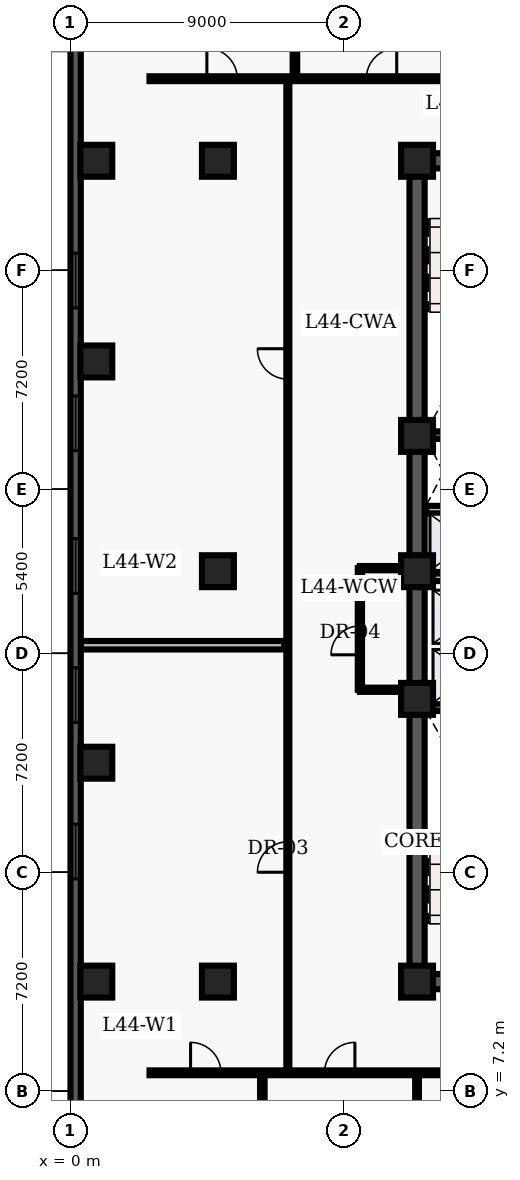
"""IFC4 building model, lengths in metres.
Left out: names, types, materials, properties, quantities, classifications, styles, units other than length and angle.
Written with IfcOpenShell. Run it as: python <this file> out.ifc"""

import sys

from ifc_helpers import new_model, entity, si_unit, converted_unit, direction, frame, origin_with_axes, origin_2d_with_axis, place, context, subcontext, project, spatial, polyline, rectangle, outline, extrude, element, fill, save


model = new_model("IFC4")
c1 = context("Model", 3, precision=1e-05, world=origin_with_axes(), true_north=direction((0.0, 1.0)))
c2 = subcontext(c1, "Body", "Model", "MODEL_VIEW")
j1 = project(units=[si_unit("LENGTHUNIT", "METRE"), converted_unit("PLANEANGLEUNIT", "DEGREE", entity("IfcPlaneAngleMeasure", 0.017), si_unit("PLANEANGLEUNIT", "RADIAN"), dimensions=[0, 0, 0, 0, 0, 0, 0])], contexts=[c1])
p1 = place(None, origin_with_axes())
s1 = spatial("IfcSite", under=j1, at=p1, CompositionType="ELEMENT")
p2 = place(p1, origin_with_axes())
s2 = spatial("IfcBuilding", under=s1, at=p2, CompositionType="ELEMENT")
p3 = place(p2, frame((0.0, 0.0, 179.7), z_axis=(0.0, 0.0, 1.0), x_axis=(1.0, 0.0, 0.0)))
s3 = spatial("IfcBuildingStorey", under=s2, at=p3, CompositionType="ELEMENT", Elevation=179.7)
p4 = place(p3, frame((11.4, 10.8, 0.0), z_axis=(0.0, 0.0, 1.0), x_axis=(0.0, 1.0, 0.0)))
e1 = element("IfcWall", 1, at=p4, inside=s3, PredefinedType="SHEAR", context=c2, shape_type="SweptSolid", body=[
    extrude(outline(polyline([(0.0, -0.25), (27.0, -0.25), (27.0, 0.25), (0.0, 0.25), (0.0, -0.25)])), origin_with_axes(), (0.0, 0.0, 1.0), 3.66),
])
p5 = place(p3, frame((11.4, 10.8, 0.0), z_axis=(0.0, 0.0, 1.0), x_axis=(1.0, 0.0, 0.0)))
e2 = element("IfcWall", 2, at=p5, inside=s3, PredefinedType="SHEAR", context=c2, shape_type="SweptSolid", body=[
    extrude(outline(polyline([(0.0, -0.25), (7.2, -0.25), (7.2, 0.25), (0.0, 0.25), (0.0, -0.25)])), origin_with_axes(), (0.0, 0.0, 1.0), 3.66),
])
p6 = place(p5, frame((2.625, 0.0, 0.0), z_axis=(0.0, 0.0, 1.0), x_axis=(1.0, 0.0, 0.0)))
e3 = element("IfcOpeningElement", 3, at=p6, cuts=e2, PredefinedType="OPENING", context=c2, shape_type="SweptSolid", body=[
    extrude(rectangle(XDim=1.05, YDim=0.52, at=origin_2d_with_axis()), origin_with_axes(), (0.0, 0.0, 1.0), 2.15),
])
p7 = place(p3, frame((11.4, 37.8, 0.0), z_axis=(0.0, 0.0, 1.0), x_axis=(1.0, 0.0, 0.0)))
e4 = element("IfcWall", 4, at=p7, inside=s3, PredefinedType="SHEAR", context=c2, shape_type="SweptSolid", body=[
    extrude(outline(polyline([(0.0, -0.25), (7.2, -0.25), (7.2, 0.25), (0.0, 0.25), (0.0, -0.25)])), origin_with_axes(), (0.0, 0.0, 1.0), 3.66),
])
p8 = place(p7, frame((2.625, 0.0, 0.0), z_axis=(0.0, 0.0, 1.0), x_axis=(1.0, 0.0, 0.0)))
e5 = element("IfcOpeningElement", 5, at=p8, cuts=e4, PredefinedType="OPENING", context=c2, shape_type="SweptSolid", body=[
    extrude(rectangle(XDim=1.05, YDim=0.52, at=origin_2d_with_axis()), origin_with_axes(), (0.0, 0.0, 1.0), 2.15),
])
for number, where, z_axis, x_axis in (
    (6, (11.65, 19.825, 0.0), (0.0, 0.0, 1.0), (1.0, 0.0, 0.0)),
    (7, (11.65, 28.775, 0.0), (0.0, 0.0, 1.0), (1.0, 0.0, 0.0)),
):
    element("IfcWall", number, at=place(p3, frame(where, z_axis=z_axis, x_axis=x_axis)), inside=s3, PredefinedType="SHEAR", context=c2, shape_type="SweptSolid", body=[
        extrude(outline(polyline([(0.0, -0.125), (6.7, -0.125), (6.7, 0.125), (0.0, 0.125), (0.0, -0.125)])), origin_with_axes(), (0.0, 0.0, 1.0), 3.66),
    ])
p9 = place(p3, frame((11.7, 24.1, 0.0), z_axis=(0.0, 0.0, 1.0), x_axis=(1.0, 0.0, 0.0)))
e8 = element("IfcWall", 8, at=p9, inside=s3, PredefinedType="SOLIDWALL", context=c2, shape_type="SweptSolid", body=[
    extrude(outline(polyline([(0.0, -0.125), (6.6, -0.125), (6.6, 0.125), (0.0, 0.125), (0.0, -0.125)])), origin_with_axes(), (0.0, 0.0, 1.0), 2.7),
])
p10 = place(p9, frame((3.75, 0.0, 0.0), z_axis=(0.0, 0.0, 1.0), x_axis=(1.0, 0.0, 0.0)))
e9 = element("IfcOpeningElement", 9, at=p10, cuts=e8, PredefinedType="OPENING", context=c2, shape_type="SweptSolid", body=[
    extrude(rectangle(XDim=0.9, YDim=0.27, at=origin_2d_with_axis()), origin_with_axes(), (0.0, 0.0, 1.0), 2.15),
])
p11 = place(p3, frame((11.7, 26.325, 0.0), z_axis=(0.0, 0.0, 1.0), x_axis=(1.0, 0.0, 0.0)))
e10 = element("IfcWall", 10, at=p11, inside=s3, PredefinedType="SOLIDWALL", context=c2, shape_type="SweptSolid", body=[
    extrude(outline(polyline([(0.0, -0.125), (6.6, -0.125), (6.6, 0.125), (0.0, 0.125), (0.0, -0.125)])), origin_with_axes(), (0.0, 0.0, 1.0), 2.7),
])
p12 = place(p11, frame((3.5, 0.0, 0.0), z_axis=(0.0, 0.0, 1.0), x_axis=(1.0, 0.0, 0.0)))
e11 = element("IfcOpeningElement", 11, at=p12, cuts=e10, PredefinedType="OPENING", context=c2, shape_type="SweptSolid", body=[
    extrude(rectangle(XDim=0.9, YDim=0.27, at=origin_2d_with_axis()), origin_with_axes(), (0.0, 0.0, 1.0), 2.15),
])
for number, where, z_axis, x_axis in (
    (12, (11.4, 10.8, 0.0), (0.0, 0.0, 1.0), (1.0, 0.0, 0.0)),
    (13, (11.4, 20.1, 0.0), (0.0, 0.0, 1.0), (1.0, 0.0, 0.0)),
    (14, (11.4, 24.3, 0.0), (0.0, 0.0, 1.0), (1.0, 0.0, 0.0)),
    (15, (11.4, 28.75, 0.0), (0.0, 0.0, 1.0), (1.0, 0.0, 0.0)),
    (16, (11.4, 37.8, 0.0), (0.0, 0.0, 1.0), (1.0, 0.0, 0.0)),
    (17, (4.85, 10.8, 0.0), (0.0, 0.0, 1.0), (1.0, 0.0, 0.0)),
    (18, (4.85, 24.3, 0.0), (0.0, 0.0, 1.0), (1.0, 0.0, 0.0)),
    (19, (4.85, 37.8, 0.0), (0.0, 0.0, 1.0), (1.0, 0.0, 0.0)),
    (20, (0.85, 10.8, 0.0), (0.0, 0.0, 1.0), (1.0, 0.0, 0.0)),
    (21, (0.85, 18.0, 0.0), (0.0, 0.0, 1.0), (1.0, 0.0, 0.0)),
    (22, (0.85, 31.2, 0.0), (0.0, 0.0, 1.0), (1.0, 0.0, 0.0)),
    (23, (0.85, 37.8, 0.0), (0.0, 0.0, 1.0), (1.0, 0.0, 0.0)),
):
    element("IfcColumn", number, at=place(p3, frame(where, z_axis=z_axis, x_axis=x_axis)), inside=s3, PredefinedType="COLUMN", context=c2, shape_type="SweptSolid", body=[
        extrude(rectangle(XDim=1.05, YDim=1.05, at=origin_2d_with_axis()), origin_with_axes(), (0.0, 0.0, 1.0), 3.9),
    ])
p13 = place(p3, frame((9.52, 20.4, 0.0), z_axis=(0.0, 0.0, 1.0), x_axis=(0.0, 1.0, 0.0)))
e24 = element("IfcWall", 24, at=p13, inside=s3, PredefinedType="PARTITIONING", context=c2, shape_type="SweptSolid", body=[
    extrude(outline(polyline([(0.0, -0.07), (4.0, -0.07), (4.0, 0.07), (0.0, 0.07), (0.0, -0.07)])), origin_with_axes(), (0.0, 0.0, 1.0), 2.7),
])
p14 = place(p13, frame((1.625, 0.0, 0.0), z_axis=(0.0, 0.0, 1.0), x_axis=(1.0, 0.0, 0.0)))
e25 = element("IfcOpeningElement", 25, at=p14, cuts=e24, PredefinedType="OPENING", context=c2, shape_type="SweptSolid", body=[
    extrude(rectangle(XDim=0.95, YDim=0.16, at=origin_2d_with_axis()), origin_with_axes(), (0.0, 0.0, 1.0), 2.15),
])
for number, where, z_axis, x_axis in (
    (26, (9.52, 20.4, 0.0), (0.0, 0.0, 1.0), (1.0, 0.0, 0.0)),
    (27, (9.52, 24.4, 0.0), (0.0, 0.0, 1.0), (1.0, 0.0, 0.0)),
):
    element("IfcWall", number, at=place(p3, frame(where, z_axis=z_axis, x_axis=x_axis)), inside=s3, PredefinedType="PARTITIONING", context=c2, shape_type="SweptSolid", body=[
        extrude(outline(polyline([(0.0, -0.07), (1.58, -0.07), (1.58, 0.07), (0.0, 0.07), (0.0, -0.07)])), origin_with_axes(), (0.0, 0.0, 1.0), 2.7),
    ])
p15 = place(p3, frame((2.6, 7.8, 0.0), z_axis=(0.0, 0.0, 1.0), x_axis=(1.0, 0.0, 0.0)))
e28 = element("IfcWall", 28, at=p15, inside=s3, PredefinedType="PARTITIONING", context=c2, shape_type="SweptSolid", body=[
    extrude(outline(polyline([(0.0, -0.08), (18.55, -0.08), (18.55, 0.08), (0.0, 0.08), (0.0, -0.08)])), origin_with_axes(), (0.0, 0.0, 1.0), 2.7),
])
p16 = place(p15, frame((1.851, 0.0, 0.0), z_axis=(0.0, 0.0, 1.0), x_axis=(1.0, 0.0, 0.0)))
e29 = element("IfcOpeningElement", 29, at=p16, cuts=e28, PredefinedType="OPENING", context=c2, shape_type="SweptSolid", body=[
    extrude(rectangle(XDim=1.0, YDim=0.18, at=origin_2d_with_axis()), origin_with_axes(), (0.0, 0.0, 1.0), 2.15),
])
p17 = place(p15, frame((6.255, 0.0, 0.0), z_axis=(0.0, 0.0, 1.0), x_axis=(1.0, 0.0, 0.0)))
e30 = element("IfcOpeningElement", 30, at=p17, cuts=e28, PredefinedType="OPENING", context=c2, shape_type="SweptSolid", body=[
    extrude(rectangle(XDim=1.0, YDim=0.18, at=origin_2d_with_axis()), origin_with_axes(), (0.0, 0.0, 1.0), 2.15),
])
p18 = place(p15, frame((10.794, 0.0, 0.0), z_axis=(0.0, 0.0, 1.0), x_axis=(1.0, 0.0, 0.0)))
e31 = element("IfcOpeningElement", 31, at=p18, cuts=e28, PredefinedType="OPENING", context=c2, shape_type="SweptSolid", body=[
    extrude(rectangle(XDim=1.0, YDim=0.18, at=origin_2d_with_axis()), origin_with_axes(), (0.0, 0.0, 1.0), 2.15),
])
p19 = place(p15, frame((15.645, 0.0, 0.0), z_axis=(0.0, 0.0, 1.0), x_axis=(1.0, 0.0, 0.0)))
e32 = element("IfcOpeningElement", 32, at=p19, cuts=e28, PredefinedType="OPENING", context=c2, shape_type="SweptSolid", body=[
    extrude(rectangle(XDim=1.0, YDim=0.18, at=origin_2d_with_axis()), origin_with_axes(), (0.0, 0.0, 1.0), 2.15),
])
p20 = place(p3, frame((2.6, 40.5, 0.0), z_axis=(0.0, 0.0, 1.0), x_axis=(1.0, 0.0, 0.0)))
e33 = element("IfcWall", 33, at=p20, inside=s3, PredefinedType="PARTITIONING", context=c2, shape_type="SweptSolid", body=[
    extrude(outline(polyline([(0.0, -0.08), (22.87, -0.08), (22.87, 0.08), (0.0, 0.08), (0.0, -0.08)])), origin_with_axes(), (0.0, 0.0, 1.0), 2.7),
])
p21 = place(p20, frame((2.386, 0.0, 0.0), z_axis=(0.0, 0.0, 1.0), x_axis=(1.0, 0.0, 0.0)))
e34 = element("IfcOpeningElement", 34, at=p21, cuts=e33, PredefinedType="OPENING", context=c2, shape_type="SweptSolid", body=[
    extrude(rectangle(XDim=1.0, YDim=0.18, at=origin_2d_with_axis()), origin_with_axes(), (0.0, 0.0, 1.0), 2.15),
])
p22 = place(p20, frame((7.631, 0.0, 0.0), z_axis=(0.0, 0.0, 1.0), x_axis=(1.0, 0.0, 0.0)))
e35 = element("IfcOpeningElement", 35, at=p22, cuts=e33, PredefinedType="OPENING", context=c2, shape_type="SweptSolid", body=[
    extrude(rectangle(XDim=1.0, YDim=0.18, at=origin_2d_with_axis()), origin_with_axes(), (0.0, 0.0, 1.0), 2.15),
])
p23 = place(p20, frame((13.999, 0.0, 0.0), z_axis=(0.0, 0.0, 1.0), x_axis=(1.0, 0.0, 0.0)))
e36 = element("IfcOpeningElement", 36, at=p23, cuts=e33, PredefinedType="OPENING", context=c2, shape_type="SweptSolid", body=[
    extrude(rectangle(XDim=1.2, YDim=0.18, at=origin_2d_with_axis()), origin_with_axes(), (0.0, 0.0, 1.0), 2.2),
])
p24 = place(p3, frame((7.15, 7.8, 0.0), z_axis=(0.0, 0.0, 1.0), x_axis=(0.0, 1.0, 0.0)))
e37 = element("IfcWall", 37, at=p24, inside=s3, PredefinedType="PARTITIONING", context=c2, shape_type="SweptSolid", body=[
    extrude(outline(polyline([(0.0, -0.05), (32.7, -0.05), (32.7, 0.05), (0.0, 0.05), (0.0, -0.05)])), origin_with_axes(), (0.0, 0.0, 1.0), 2.7),
])
p25 = place(p24, frame((7.098, 0.0, 0.0), z_axis=(0.0, 0.0, 1.0), x_axis=(1.0, 0.0, 0.0)))
e38 = element("IfcOpeningElement", 38, at=p25, cuts=e37, PredefinedType="OPENING", context=c2, shape_type="SweptSolid", body=[
    extrude(rectangle(XDim=1.0, YDim=0.12, at=origin_2d_with_axis()), origin_with_axes(), (0.0, 0.0, 1.0), 2.15),
])
p26 = place(p24, frame((23.317, 0.0, 0.0), z_axis=(0.0, 0.0, 1.0), x_axis=(1.0, 0.0, 0.0)))
e39 = element("IfcOpeningElement", 39, at=p26, cuts=e37, PredefinedType="OPENING", context=c2, shape_type="SweptSolid", body=[
    extrude(rectangle(XDim=1.0, YDim=0.12, at=origin_2d_with_axis()), origin_with_axes(), (0.0, 0.0, 1.0), 2.15),
])
p27 = place(p3, frame((0.335, 21.865, 0.0), z_axis=(0.0, 0.0, 1.0), x_axis=(1.0, 0.0, 0.0)))
e40 = element("IfcWall", 40, at=p27, inside=s3, PredefinedType="PARTITIONING", context=c2, shape_type="SweptSolid", body=[
    extrude(outline(polyline([(0.0, -0.14), (6.695, -0.14), (6.695, 0.14), (0.0, 0.14), (0.0, -0.14)])), origin_with_axes(), (0.0, 0.0, 1.0), 2.7),
])
p28 = place(p3, frame((6.311, 0.335, 0.0), z_axis=(0.0, 0.0, 1.0), x_axis=(0.0, 1.0, 0.0)))
e41 = element("IfcWall", 41, at=p28, inside=s3, PredefinedType="PARTITIONING", context=c2, shape_type="SweptSolid", body=[
    extrude(outline(polyline([(0.0, -0.075), (7.365, -0.075), (7.365, 0.075), (0.0, 0.075), (0.0, -0.075)])), origin_with_axes(), (0.0, 0.0, 1.0), 2.7),
])
p29 = place(p3, frame((11.4, 0.335, 0.0), z_axis=(0.0, 0.0, 1.0), x_axis=(0.0, 1.0, 0.0)))
e42 = element("IfcWall", 42, at=p29, inside=s3, PredefinedType="PARTITIONING", context=c2, shape_type="SweptSolid", body=[
    extrude(outline(polyline([(0.0, -0.062), (7.365, -0.062), (7.365, 0.062), (0.0, 0.062), (0.0, -0.062)])), origin_with_axes(), (0.0, 0.0, 1.0), 2.7),
])
p30 = place(p3, frame((7.383, 40.6, 0.0), z_axis=(0.0, 0.0, 1.0), x_axis=(0.0, 1.0, 0.0)))
e43 = element("IfcWall", 43, at=p30, inside=s3, PredefinedType="PARTITIONING", context=c2, shape_type="SweptSolid", body=[
    extrude(outline(polyline([(0.0, -0.075), (7.665, -0.075), (7.665, 0.075), (0.0, 0.075), (0.0, -0.075)])), origin_with_axes(), (0.0, 0.0, 1.0), 2.7),
])
p31 = place(p3, frame((0.17, 2.74, 0.0), z_axis=(0.0, 0.0, 1.0), x_axis=(0.0, 1.0, 0.0)))
e44 = element("IfcWall", 44, at=p31, inside=s3, PredefinedType="SOLIDWALL", context=c2, shape_type="SweptSolid", body=[
    extrude(outline(polyline([(0.0, -0.17), (43.46, -0.17), (43.46, 0.17), (0.0, 0.17), (0.0, -0.17)])), origin_with_axes(), (0.0, 0.0, 1.0), 3.66),
])
p32 = place(p31, frame((2.948, 0.0, 0.45), z_axis=(0.0, 0.0, 1.0), x_axis=(1.0, 0.0, 0.0)))
e45 = element("IfcOpeningElement", 45, at=p32, cuts=e44, PredefinedType="OPENING", context=c2, shape_type="SweptSolid", body=[
    extrude(rectangle(XDim=1.8, YDim=0.36, at=origin_2d_with_axis()), origin_with_axes(), (0.0, 0.0, 1.0), 2.1),
])
p33 = place(p31, frame((12.339, 0.0, 0.45), z_axis=(0.0, 0.0, 1.0), x_axis=(1.0, 0.0, 0.0)))
e46 = element("IfcOpeningElement", 46, at=p33, cuts=e44, PredefinedType="OPENING", context=c2, shape_type="SweptSolid", body=[
    extrude(rectangle(XDim=1.8, YDim=0.36, at=origin_2d_with_axis()), origin_with_axes(), (0.0, 0.0, 1.0), 2.1),
])
p34 = place(p31, frame((17.484, 0.0, 0.45), z_axis=(0.0, 0.0, 1.0), x_axis=(1.0, 0.0, 0.0)))
e47 = element("IfcOpeningElement", 47, at=p34, cuts=e44, PredefinedType="OPENING", context=c2, shape_type="SweptSolid", body=[
    extrude(rectangle(XDim=1.8, YDim=0.36, at=origin_2d_with_axis()), origin_with_axes(), (0.0, 0.0, 1.0), 2.1),
])
p35 = place(p31, frame((21.73, 0.0, 0.45), z_axis=(0.0, 0.0, 1.0), x_axis=(1.0, 0.0, 0.0)))
e48 = element("IfcOpeningElement", 48, at=p35, cuts=e44, PredefinedType="OPENING", context=c2, shape_type="SweptSolid", body=[
    extrude(rectangle(XDim=1.8, YDim=0.36, at=origin_2d_with_axis()), origin_with_axes(), (0.0, 0.0, 1.0), 2.1),
])
p36 = place(p31, frame((26.426, 0.0, 0.45), z_axis=(0.0, 0.0, 1.0), x_axis=(1.0, 0.0, 0.0)))
e49 = element("IfcOpeningElement", 49, at=p36, cuts=e44, PredefinedType="OPENING", context=c2, shape_type="SweptSolid", body=[
    extrude(rectangle(XDim=1.8, YDim=0.36, at=origin_2d_with_axis()), origin_with_axes(), (0.0, 0.0, 1.0), 2.1),
])
p37 = place(p31, frame((31.121, 0.0, 0.45), z_axis=(0.0, 0.0, 1.0), x_axis=(1.0, 0.0, 0.0)))
e50 = element("IfcOpeningElement", 50, at=p37, cuts=e44, PredefinedType="OPENING", context=c2, shape_type="SweptSolid", body=[
    extrude(rectangle(XDim=1.8, YDim=0.36, at=origin_2d_with_axis()), origin_with_axes(), (0.0, 0.0, 1.0), 2.1),
])
p38 = place(p31, frame((40.062, 0.0, 0.45), z_axis=(0.0, 0.0, 1.0), x_axis=(1.0, 0.0, 0.0)))
e51 = element("IfcOpeningElement", 51, at=p38, cuts=e44, PredefinedType="OPENING", context=c2, shape_type="SweptSolid", body=[
    extrude(rectangle(XDim=1.8, YDim=0.36, at=origin_2d_with_axis()), origin_with_axes(), (0.0, 0.0, 1.0), 2.1),
])
p39 = place(p13, frame((1.625, 0.0, 0.0), z_axis=(0.0, 0.0, 1.0), x_axis=(1.0, 0.0, 0.0)))
e52 = element("IfcDoor", 52, at=p39, inside=s3, OperationType="SINGLE_SWING_LEFT", PredefinedType="DOOR", context=c2, shape_type="SweptSolid", body=[
    extrude(rectangle(XDim=0.95, YDim=0.084, at=origin_2d_with_axis()), origin_with_axes(), (0.0, 0.0, 1.0), 2.15),
])
fill(e25, e52)
p40 = place(p24, frame((7.098, 0.0, 0.0), z_axis=(0.0, 0.0, 1.0), x_axis=(1.0, 0.0, 0.0)))
e53 = element("IfcDoor", 53, at=p40, inside=s3, OperationType="SINGLE_SWING_LEFT", PredefinedType="DOOR", context=c2, shape_type="SweptSolid", body=[
    extrude(rectangle(XDim=1.0, YDim=0.06, at=origin_2d_with_axis()), origin_with_axes(), (0.0, 0.0, 1.0), 2.15),
])
fill(e38, e53)
p41 = place(p24, frame((23.317, 0.0, 0.0), z_axis=(0.0, 0.0, 1.0), x_axis=(1.0, 0.0, 0.0)))
e54 = element("IfcDoor", 54, at=p41, inside=s3, OperationType="SINGLE_SWING_RIGHT", PredefinedType="DOOR", context=c2, shape_type="SweptSolid", body=[
    extrude(rectangle(XDim=1.0, YDim=0.06, at=origin_2d_with_axis()), origin_with_axes(), (0.0, 0.0, 1.0), 2.15),
])
fill(e39, e54)
p42 = place(p15, frame((1.851, 0.0, 0.0), z_axis=(0.0, 0.0, 1.0), x_axis=(1.0, 0.0, 0.0)))
e55 = element("IfcDoor", 55, at=p42, inside=s3, OperationType="SINGLE_SWING_LEFT", PredefinedType="DOOR", context=c2, shape_type="SweptSolid", body=[
    extrude(rectangle(XDim=1.0, YDim=0.09, at=origin_2d_with_axis()), origin_with_axes(), (0.0, 0.0, 1.0), 2.15),
])
fill(e29, e55)
p43 = place(p15, frame((6.255, 0.0, 0.0), z_axis=(0.0, 0.0, 1.0), x_axis=(1.0, 0.0, 0.0)))
e56 = element("IfcDoor", 56, at=p43, inside=s3, OperationType="SINGLE_SWING_RIGHT", PredefinedType="DOOR", context=c2, shape_type="SweptSolid", body=[
    extrude(rectangle(XDim=1.0, YDim=0.09, at=origin_2d_with_axis()), origin_with_axes(), (0.0, 0.0, 1.0), 2.15),
])
fill(e30, e56)
p44 = place(p20, frame((2.386, 0.0, 0.0), z_axis=(0.0, 0.0, 1.0), x_axis=(1.0, 0.0, 0.0)))
e57 = element("IfcDoor", 57, at=p44, inside=s3, OperationType="SINGLE_SWING_LEFT", PredefinedType="DOOR", context=c2, shape_type="SweptSolid", body=[
    extrude(rectangle(XDim=1.0, YDim=0.09, at=origin_2d_with_axis()), origin_with_axes(), (0.0, 0.0, 1.0), 2.15),
])
fill(e34, e57)
p45 = place(p20, frame((7.631, 0.0, 0.0), z_axis=(0.0, 0.0, 1.0), x_axis=(1.0, 0.0, 0.0)))
e58 = element("IfcDoor", 58, at=p45, inside=s3, OperationType="SINGLE_SWING_RIGHT", PredefinedType="DOOR", context=c2, shape_type="SweptSolid", body=[
    extrude(rectangle(XDim=1.0, YDim=0.09, at=origin_2d_with_axis()), origin_with_axes(), (0.0, 0.0, 1.0), 2.15),
])
fill(e35, e58)
p46 = place(p31, frame((12.339, 0.0, 0.45), z_axis=(0.0, 0.0, 1.0), x_axis=(1.0, 0.0, 0.0)))
e59 = element("IfcWindow", 59, at=p46, inside=s3, PredefinedType="WINDOW", context=c2, shape_type="SweptSolid", body=[
    extrude(rectangle(XDim=1.8, YDim=0.09, at=origin_2d_with_axis()), origin_with_axes(), (0.0, 0.0, 1.0), 2.1),
])
fill(e46, e59)
p47 = place(p31, frame((17.484, 0.0, 0.45), z_axis=(0.0, 0.0, 1.0), x_axis=(1.0, 0.0, 0.0)))
e60 = element("IfcWindow", 60, at=p47, inside=s3, PredefinedType="WINDOW", context=c2, shape_type="SweptSolid", body=[
    extrude(rectangle(XDim=1.8, YDim=0.09, at=origin_2d_with_axis()), origin_with_axes(), (0.0, 0.0, 1.0), 2.1),
])
fill(e47, e60)
p48 = place(p31, frame((21.73, 0.0, 0.45), z_axis=(0.0, 0.0, 1.0), x_axis=(1.0, 0.0, 0.0)))
e61 = element("IfcWindow", 61, at=p48, inside=s3, PredefinedType="WINDOW", context=c2, shape_type="SweptSolid", body=[
    extrude(rectangle(XDim=1.8, YDim=0.09, at=origin_2d_with_axis()), origin_with_axes(), (0.0, 0.0, 1.0), 2.1),
])
fill(e48, e61)
p49 = place(p31, frame((26.426, 0.0, 0.45), z_axis=(0.0, 0.0, 1.0), x_axis=(1.0, 0.0, 0.0)))
e62 = element("IfcWindow", 62, at=p49, inside=s3, PredefinedType="WINDOW", context=c2, shape_type="SweptSolid", body=[
    extrude(rectangle(XDim=1.8, YDim=0.09, at=origin_2d_with_axis()), origin_with_axes(), (0.0, 0.0, 1.0), 2.1),
])
fill(e49, e62)
p50 = place(p31, frame((31.121, 0.0, 0.45), z_axis=(0.0, 0.0, 1.0), x_axis=(1.0, 0.0, 0.0)))
e63 = element("IfcWindow", 63, at=p50, inside=s3, PredefinedType="WINDOW", context=c2, shape_type="SweptSolid", body=[
    extrude(rectangle(XDim=1.8, YDim=0.09, at=origin_2d_with_axis()), origin_with_axes(), (0.0, 0.0, 1.0), 2.1),
])
fill(e50, e63)
save(model, sys.argv[1])
